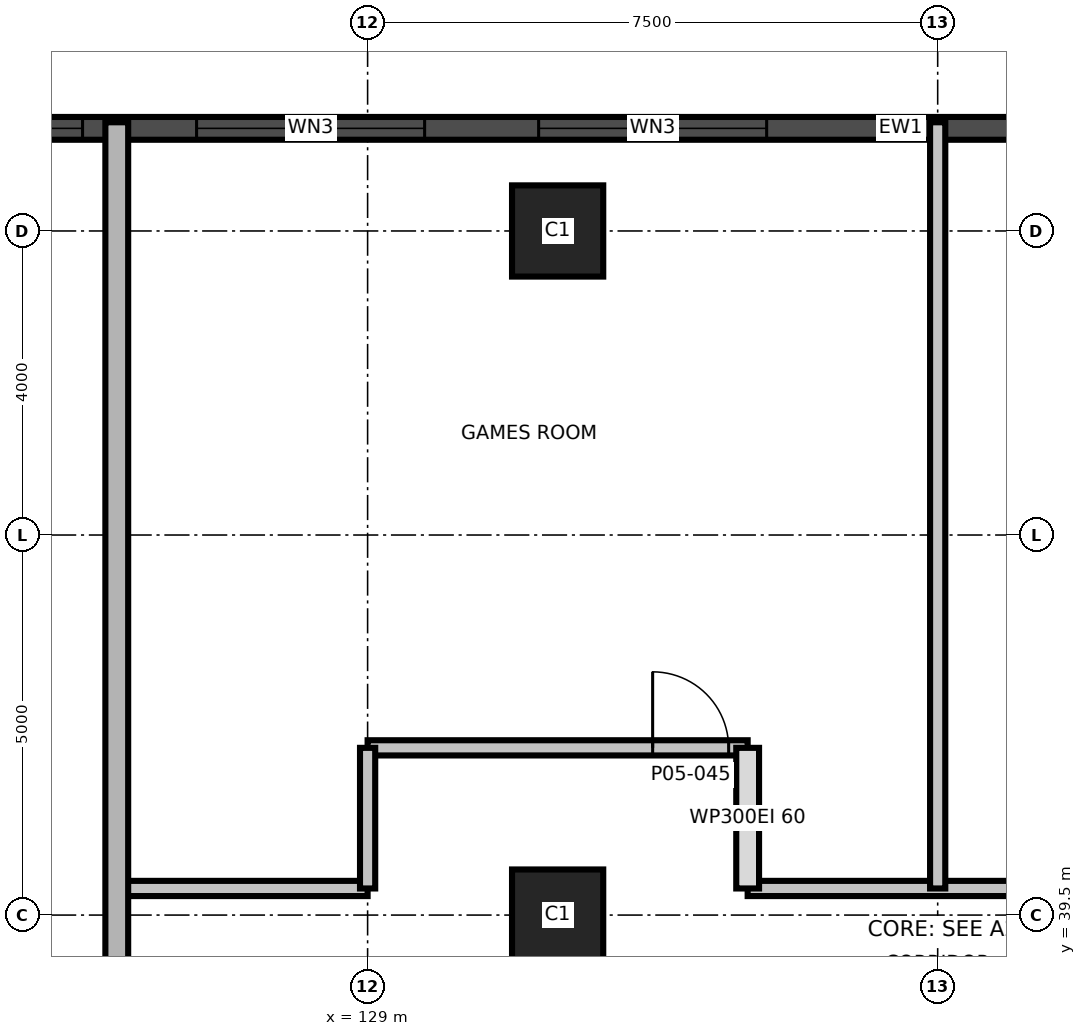
"""IFC4 building model, lengths in metres.
Left out: names, types, materials, properties, quantities, classifications, styles, units other than length and angle.
Written with IfcOpenShell. Run it as: python <this file> out.ifc"""

import sys

from ifc_helpers import new_model, si_unit, direction, frame, frame_2d, origin, origin_2d, place, context, subcontext, project, spatial, rectangle, extrude, element, fill, save


model = new_model("IFC4")
c1 = context("Model", 3, precision=1e-05, world=origin(), true_north=direction((0.0, 1.0)))
c2 = subcontext(c1, "Body", "Model", "MODEL_VIEW")
j1 = project(units=[si_unit("LENGTHUNIT", "METRE"), si_unit("PLANEANGLEUNIT", "RADIAN")], contexts=[c1])
p1 = place(None, origin())
s1 = spatial("IfcSite", under=j1, at=p1, CompositionType="ELEMENT")
p2 = place(p1, origin())
s2 = spatial("IfcBuilding", under=s1, at=p2, CompositionType="ELEMENT")
p3 = place(p2, frame((0.0, 0.0, 28.5)))
s3 = spatial("IfcBuildingStorey", under=s2, at=p3, CompositionType="ELEMENT", Elevation=28.5)
for number, where, z_axis, x_axis in (
    (1, (131.5, 39.5, 0.0), (0.0, 0.0, 1.0), (1.0, 0.0, 0.0)),
    (2, (131.5, 48.5, 0.0), (0.0, 0.0, 1.0), (1.0, 0.0, 0.0)),
):
    element("IfcColumn", number, at=place(p3, frame(where, z_axis=z_axis, x_axis=x_axis)), inside=s3, PredefinedType="COLUMN", context=c2, shape_type="SweptSolid", body=[
        extrude(rectangle(XDim=1.2, YDim=1.2, at=origin_2d()), origin(), (0.0, 0.0, 1.0), 5.0),
    ])
p4 = place(p3, frame((153.952, 49.85, 0.0), z_axis=(0.0, 0.0, 1.0), x_axis=(-1.0, 0.0, 0.0)))
e3 = element("IfcWall", 3, at=p4, inside=s3, PredefinedType="SOLIDWALL", context=c2, shape_type="SweptSolid", body=[
    extrude(rectangle(XDim=35.88, YDim=0.3, at=frame_2d((17.94, 0.0))), origin(), (0.0, 0.0, 1.0), 4.7),
])
p5 = place(p4, frame((1.226, 0.0, 0.9)))
e4 = element("IfcOpeningElement", 4, at=p5, cuts=e3, PredefinedType="OPENING", context=c2, shape_type="SweptSolid", body=[
    extrude(rectangle(XDim=3.0, YDim=2.4, at=frame_2d((1.5, 1.2))), frame((0.0, 0.16, 0.0), z_axis=(0.0, -1.0, 0.0), x_axis=(1.0, 0.0, 0.0)), (0.0, 0.0, 1.0), 0.32),
])
p6 = place(p4, frame((10.702, 0.0, 0.9)))
e5 = element("IfcOpeningElement", 5, at=p6, cuts=e3, PredefinedType="OPENING", context=c2, shape_type="SweptSolid", body=[
    extrude(rectangle(XDim=3.0, YDim=2.4, at=frame_2d((1.5, 1.2))), frame((0.0, 0.16, 0.0), z_axis=(0.0, -1.0, 0.0), x_axis=(1.0, 0.0, 0.0)), (0.0, 0.0, 1.0), 0.32),
])
p7 = place(p4, frame((19.702, 0.0, 0.9)))
e6 = element("IfcOpeningElement", 6, at=p7, cuts=e3, PredefinedType="OPENING", context=c2, shape_type="SweptSolid", body=[
    extrude(rectangle(XDim=3.0, YDim=2.4, at=frame_2d((1.5, 1.2))), frame((0.0, 0.16, 0.0), z_axis=(0.0, -1.0, 0.0), x_axis=(1.0, 0.0, 0.0)), (0.0, 0.0, 1.0), 0.32),
])
p8 = place(p4, frame((24.202, 0.0, 0.9)))
e7 = element("IfcOpeningElement", 7, at=p8, cuts=e3, PredefinedType="OPENING", context=c2, shape_type="SweptSolid", body=[
    extrude(rectangle(XDim=3.0, YDim=2.4, at=frame_2d((1.5, 1.2))), frame((0.0, 0.16, 0.0), z_axis=(0.0, -1.0, 0.0), x_axis=(1.0, 0.0, 0.0)), (0.0, 0.0, 1.0), 0.32),
])
p9 = place(p4, frame((28.702, 0.0, 0.9)))
e8 = element("IfcOpeningElement", 8, at=p9, cuts=e3, PredefinedType="OPENING", context=c2, shape_type="SweptSolid", body=[
    extrude(rectangle(XDim=3.0, YDim=2.4, at=frame_2d((1.5, 1.2))), frame((0.0, 0.16, 0.0), z_axis=(0.0, -1.0, 0.0), x_axis=(1.0, 0.0, 0.0)), (0.0, 0.0, 1.0), 0.32),
])
p10 = place(p3, frame((125.75, 39.85, 0.0), z_axis=(0.0, 0.0, 1.0), x_axis=(1.0, 0.0, 0.0)))
e9 = element("IfcWall", 9, at=p10, inside=s3, PredefinedType="PARTITIONING", context=c2, shape_type="SweptSolid", body=[
    extrude(rectangle(XDim=3.25, YDim=0.2, at=frame_2d((1.625, 0.0))), origin(), (0.0, 0.0, 1.0), 3.8),
])
p11 = place(p3, frame((134.0, 39.85, 0.0), z_axis=(0.0, 0.0, 1.0), x_axis=(1.0, 0.0, 0.0)))
e10 = element("IfcWall", 10, at=p11, inside=s3, PredefinedType="PARTITIONING", context=c2, shape_type="SweptSolid", body=[
    extrude(rectangle(XDim=4.0, YDim=0.2, at=frame_2d((2.0, 0.0))), origin(), (0.0, 0.0, 1.0), 3.8),
])
p12 = place(p3, frame((129.0, 41.7, 0.0), z_axis=(0.0, 0.0, 1.0), x_axis=(1.0, 0.0, 0.0)))
e11 = element("IfcWall", 11, at=p12, inside=s3, PredefinedType="PARTITIONING", context=c2, shape_type="SweptSolid", body=[
    extrude(rectangle(XDim=5.0, YDim=0.2, at=frame_2d((2.5, 0.0))), origin(), (0.0, 0.0, 1.0), 3.8),
])
p13 = place(p12, frame((3.75, 0.0, 0.0)))
e12 = element("IfcOpeningElement", 12, at=p13, cuts=e11, PredefinedType="OPENING", context=c2, shape_type="SweptSolid", body=[
    extrude(rectangle(XDim=1.0, YDim=2.1, at=frame_2d((0.5, 1.05))), frame((0.0, 0.11, 0.0), z_axis=(0.0, -1.0, 0.0), x_axis=(1.0, 0.0, 0.0)), (0.0, 0.0, 1.0), 0.22),
])
p14 = place(p3, frame((125.7, 11.07, 0.0), z_axis=(0.0, 0.0, 1.0), x_axis=(0.0, 1.0, 0.0)))
e13 = element("IfcWall", 13, at=p14, inside=s3, PredefinedType="SHEAR", context=c2, shape_type="SweptSolid", body=[
    extrude(rectangle(XDim=38.86, YDim=0.3, at=frame_2d((19.43, 0.0))), origin(), (0.0, 0.0, 1.0), 4.65),
])
p15 = place(p14, frame((24.73, 0.0, 0.0)))
e14 = element("IfcOpeningElement", 14, at=p15, cuts=e13, PredefinedType="OPENING", context=c2, shape_type="SweptSolid", body=[
    extrude(rectangle(XDim=1.2, YDim=2.1, at=frame_2d((0.6, 1.05))), frame((0.0, 0.16, 0.0), z_axis=(0.0, -1.0, 0.0), x_axis=(1.0, 0.0, 0.0)), (0.0, 0.0, 1.0), 0.32),
])
p16 = place(p3, frame((129.0, 39.85, 0.0), z_axis=(0.0, 0.0, 1.0), x_axis=(0.0, 1.0, 0.0)))
e15 = element("IfcWall", 15, at=p16, inside=s3, PredefinedType="PARTITIONING", context=c2, shape_type="SweptSolid", body=[
    extrude(rectangle(XDim=1.85, YDim=0.2, at=frame_2d((0.925, 0.0))), origin(), (0.0, 0.0, 1.0), 3.8),
])
p17 = place(p3, frame((134.0, 39.85, 0.0), z_axis=(0.0, 0.0, 1.0), x_axis=(0.0, 1.0, 0.0)))
e16 = element("IfcWall", 16, at=p17, inside=s3, PredefinedType="PARTITIONING", context=c2, shape_type="SweptSolid", body=[
    extrude(rectangle(XDim=1.85, YDim=0.3, at=frame_2d((0.925, 0.0))), origin(), (0.0, 0.0, 1.0), 3.8),
])
p18 = place(p3, frame((136.5, 39.85, 0.0), z_axis=(0.0, 0.0, 1.0), x_axis=(0.0, 1.0, 0.0)))
e17 = element("IfcWall", 17, at=p18, inside=s3, PredefinedType="PARTITIONING", context=c2, shape_type="SweptSolid", body=[
    extrude(rectangle(XDim=10.08, YDim=0.2, at=frame_2d((5.04, 0.0))), origin(), (0.0, 0.0, 1.0), 3.8),
])
p19 = place(p7, origin())
e18 = element("IfcWindow", 18, at=p19, inside=s3, PartitioningType="SINGLE_PANEL", PredefinedType="WINDOW", context=c2, shape_type="SweptSolid", body=[
    extrude(rectangle(XDim=3.0, YDim=2.4, at=frame_2d((1.5, 1.2))), frame((0.0, 0.03, 0.0), z_axis=(0.0, -1.0, 0.0), x_axis=(1.0, 0.0, 0.0)), (0.0, 0.0, 1.0), 0.06),
])
fill(e6, e18)
p20 = place(p8, origin())
e19 = element("IfcWindow", 19, at=p20, inside=s3, PartitioningType="SINGLE_PANEL", PredefinedType="WINDOW", context=c2, shape_type="SweptSolid", body=[
    extrude(rectangle(XDim=3.0, YDim=2.4, at=frame_2d((1.5, 1.2))), frame((0.0, 0.03, 0.0), z_axis=(0.0, -1.0, 0.0), x_axis=(1.0, 0.0, 0.0)), (0.0, 0.0, 1.0), 0.06),
])
fill(e7, e19)
p21 = place(p9, origin())
e20 = element("IfcWindow", 20, at=p21, inside=s3, PartitioningType="SINGLE_PANEL", PredefinedType="WINDOW", context=c2, shape_type="SweptSolid", body=[
    extrude(rectangle(XDim=3.0, YDim=2.4, at=frame_2d((1.5, 1.2))), frame((0.0, 0.03, 0.0), z_axis=(0.0, -1.0, 0.0), x_axis=(1.0, 0.0, 0.0)), (0.0, 0.0, 1.0), 0.06),
])
fill(e8, e20)
p22 = place(p13, origin())
e21 = element("IfcDoor", 21, at=p22, inside=s3, OperationType="SINGLE_SWING_LEFT", PredefinedType="DOOR", context=c2, shape_type="SweptSolid", body=[
    extrude(rectangle(XDim=1.0, YDim=2.1, at=frame_2d((0.5, 1.05))), frame((0.0, 0.025, 0.0), z_axis=(0.0, -1.0, 0.0), x_axis=(1.0, 0.0, 0.0)), (0.0, 0.0, 1.0), 0.05),
])
fill(e12, e21)
save(model, sys.argv[1])
